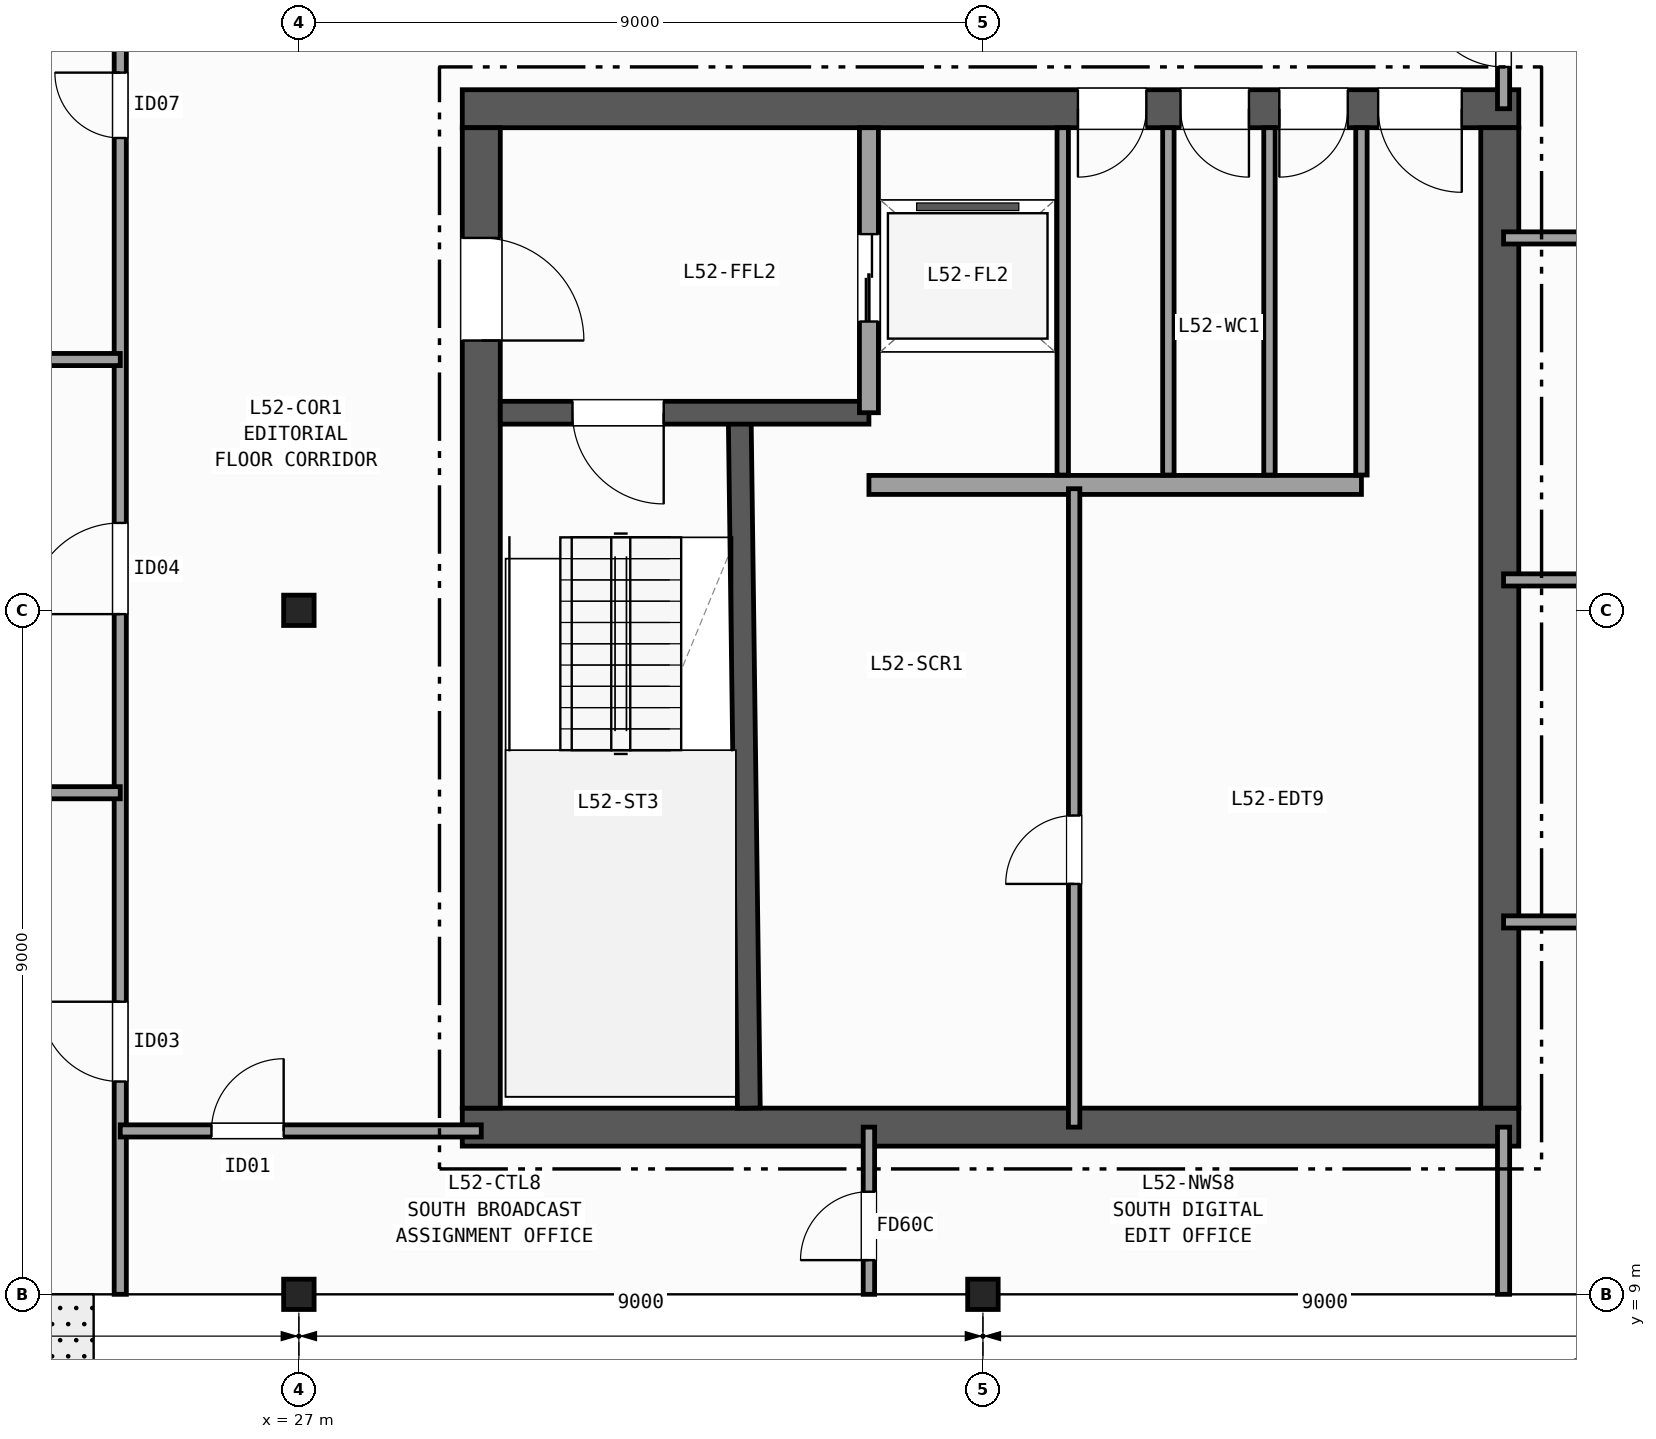
"""IFC4 building model, lengths in metres.
Left out: names, types, materials, properties, quantities, classifications, styles, units other than length and angle.
Written with IfcOpenShell. Run it as: python <this file> out.ifc"""

import sys

from ifc_helpers import new_model, si_unit, direction, frame, frame_2d, origin, origin_2d, place, context, subcontext, project, spatial, rectangle, i_section, extrude, element, fill, save


model = new_model("IFC4")
c1 = context("Model", 3, precision=1e-05, world=origin(), true_north=direction((0.0, 1.0)))
c2 = subcontext(c1, "Body", "Model", "MODEL_VIEW")
j1 = project(units=[si_unit("LENGTHUNIT", "METRE"), si_unit("PLANEANGLEUNIT", "RADIAN")], contexts=[c1])
p1 = place(None, origin())
s1 = spatial("IfcSite", under=j1, at=p1, CompositionType="ELEMENT")
p2 = place(p1, origin())
s2 = spatial("IfcBuilding", under=s1, at=p2, CompositionType="ELEMENT")
p3 = place(p2, frame((0.0, 0.0, 209.9)))
s3 = spatial("IfcBuildingStorey", under=s2, at=p3, CompositionType="ELEMENT", Elevation=209.9)
for number, where, z_axis, x_axis in (
    (1, (27.0, 9.0, 0.0), (0.0, 0.0, 1.0), (1.0, 0.0, 0.0)),
    (2, (27.0, 18.0, 0.0), (0.0, 0.0, 1.0), (1.0, 0.0, 0.0)),
    (3, (36.0, 9.0, 0.0), (0.0, 0.0, 1.0), (1.0, 0.0, 0.0)),
):
    element("IfcColumn", number, at=place(p3, frame(where, z_axis=z_axis, x_axis=x_axis)), inside=s3, PredefinedType="COLUMN", context=c2, shape_type="SweptSolid", body=[
        extrude(i_section(OverallWidth=0.401, OverallDepth=0.399, WebThickness=0.025, FlangeThickness=0.04, FilletRadius=0.015, at=origin_2d()), origin(), (0.0, 0.0, 1.0), 3.7),
    ])
p4 = place(p3, frame((29.15, 11.2, 0.0), z_axis=(0.0, 0.0, 1.0), x_axis=(1.0, 0.0, 0.0)))
e4 = element("IfcWall", 4, at=p4, inside=s3, PredefinedType="SHEAR", context=c2, shape_type="SweptSolid", body=[
    extrude(rectangle(XDim=13.9, YDim=0.5, at=frame_2d((6.95, 0.0))), origin(), (0.0, 0.0, 1.0), 3.42),
])
p5 = place(p3, frame((43.05, 24.6, 0.0), z_axis=(0.0, 0.0, 1.0), x_axis=(-1.0, 0.0, 0.0)))
e5 = element("IfcWall", 5, at=p5, inside=s3, PredefinedType="SHEAR", context=c2, shape_type="SweptSolid", body=[
    extrude(rectangle(XDim=13.9, YDim=0.5, at=frame_2d((6.95, 0.0))), origin(), (0.0, 0.0, 1.0), 3.42),
])
p6 = place(p5, frame((0.75, 0.0, 0.0)))
e6 = element("IfcOpeningElement", 6, at=p6, cuts=e5, PredefinedType="OPENING", context=c2, shape_type="SweptSolid", body=[
    extrude(rectangle(XDim=1.1, YDim=2.15, at=frame_2d((0.55, 1.075))), frame((0.0, 0.26, 0.0), z_axis=(0.0, -1.0, 0.0), x_axis=(1.0, 0.0, 0.0)), (0.0, 0.0, 1.0), 0.52),
])
p7 = place(p5, frame((2.25, 0.0, 0.0)))
e7 = element("IfcOpeningElement", 7, at=p7, cuts=e5, PredefinedType="OPENING", context=c2, shape_type="SweptSolid", body=[
    extrude(rectangle(XDim=0.9, YDim=2.1, at=frame_2d((0.45, 1.05))), frame((0.0, 0.26, 0.0), z_axis=(0.0, -1.0, 0.0), x_axis=(1.0, 0.0, 0.0)), (0.0, 0.0, 1.0), 0.52),
])
p8 = place(p5, frame((3.55, 0.0, 0.0)))
e8 = element("IfcOpeningElement", 8, at=p8, cuts=e5, PredefinedType="OPENING", context=c2, shape_type="SweptSolid", body=[
    extrude(rectangle(XDim=0.9, YDim=2.1, at=frame_2d((0.45, 1.05))), frame((0.0, 0.26, 0.0), z_axis=(0.0, -1.0, 0.0), x_axis=(1.0, 0.0, 0.0)), (0.0, 0.0, 1.0), 0.52),
])
p9 = place(p5, frame((4.9, 0.0, 0.0)))
e9 = element("IfcOpeningElement", 9, at=p9, cuts=e5, PredefinedType="OPENING", context=c2, shape_type="SweptSolid", body=[
    extrude(rectangle(XDim=0.9, YDim=2.1, at=frame_2d((0.45, 1.05))), frame((0.0, 0.26, 0.0), z_axis=(0.0, -1.0, 0.0), x_axis=(1.0, 0.0, 0.0)), (0.0, 0.0, 1.0), 0.52),
])
p10 = place(p3, frame((29.4, 24.35, 0.0), z_axis=(0.0, 0.0, 1.0), x_axis=(0.0, -1.0, 0.0)))
e10 = element("IfcWall", 10, at=p10, inside=s3, PredefinedType="SHEAR", context=c2, shape_type="SweptSolid", body=[
    extrude(rectangle(XDim=12.9, YDim=0.5, at=frame_2d((6.45, 0.0))), origin(), (0.0, 0.0, 1.0), 3.42),
])
p11 = place(p10, frame((1.45, 0.0, 0.0)))
e11 = element("IfcOpeningElement", 11, at=p11, cuts=e10, PredefinedType="OPENING", context=c2, shape_type="SweptSolid", body=[
    extrude(rectangle(XDim=1.35, YDim=2.15, at=frame_2d((0.675, 1.075))), frame((0.0, 0.26, 0.0), z_axis=(0.0, -1.0, 0.0), x_axis=(1.0, 0.0, 0.0)), (0.0, 0.0, 1.0), 0.52),
])
p12 = place(p3, frame((42.8, 11.45, 0.0), z_axis=(0.0, 0.0, 1.0), x_axis=(0.0, 1.0, 0.0)))
e12 = element("IfcWall", 12, at=p12, inside=s3, PredefinedType="SHEAR", context=c2, shape_type="SweptSolid", body=[
    extrude(rectangle(XDim=12.9, YDim=0.5, at=frame_2d((6.45, 0.0))), origin(), (0.0, 0.0, 1.0), 3.42),
])
p13 = place(p3, frame((32.92, 11.45, 0.0), z_axis=(0.0, 0.0, 1.0), x_axis=(-0.013171578211, 0.999913251001, 0.0)))
e13 = element("IfcWall", 13, at=p13, inside=s3, PredefinedType="SHEAR", context=c2, shape_type="SweptSolid", body=[
    extrude(rectangle(XDim=9.101, YDim=0.3, at=frame_2d((4.55, 0.0))), origin(), (0.0, 0.0, 1.0), 3.42),
])
p14 = place(p3, frame((34.5, 20.6, 0.0), z_axis=(0.0, 0.0, 1.0), x_axis=(-1.0, 0.0, 0.0)))
e14 = element("IfcWall", 14, at=p14, inside=s3, PredefinedType="SHEAR", context=c2, shape_type="SweptSolid", body=[
    extrude(rectangle(XDim=4.85, YDim=0.3, at=frame_2d((2.425, 0.0))), origin(), (0.0, 0.0, 1.0), 3.42),
])
p15 = place(p14, frame((2.7, 0.0, 0.0)))
e15 = element("IfcOpeningElement", 15, at=p15, cuts=e14, PredefinedType="OPENING", context=c2, shape_type="SweptSolid", body=[
    extrude(rectangle(XDim=1.2, YDim=2.15, at=frame_2d((0.6, 1.075))), frame((0.0, 0.16, 0.0), z_axis=(0.0, -1.0, 0.0), x_axis=(1.0, 0.0, 0.0)), (0.0, 0.0, 1.0), 0.32),
])
p16 = place(p3, frame((34.5, 20.6, 0.0), z_axis=(0.0, 0.0, 1.0), x_axis=(0.0, 1.0, 0.0)))
e16 = element("IfcWall", 16, at=p16, inside=s3, PredefinedType="PARTITIONING", context=c2, shape_type="SweptSolid", body=[
    extrude(rectangle(XDim=3.75, YDim=0.25, at=frame_2d((1.875, 0.0))), origin(), (0.0, 0.0, 1.0), 3.42),
])
p17 = place(p16, frame((1.2, 0.0, 0.0)))
e17 = element("IfcOpeningElement", 17, at=p17, cuts=e16, PredefinedType="OPENING", context=c2, shape_type="SweptSolid", body=[
    extrude(rectangle(XDim=1.15, YDim=2.15, at=frame_2d((0.575, 1.075))), frame((0.0, 0.135, 0.0), z_axis=(0.0, -1.0, 0.0), x_axis=(1.0, 0.0, 0.0)), (0.0, 0.0, 1.0), 0.27),
])
p18 = place(p3, frame((34.5, 19.65, 0.0), z_axis=(0.0, 0.0, 1.0), x_axis=(1.0, 0.0, 0.0)))
e18 = element("IfcWall", 18, at=p18, inside=s3, PredefinedType="PARTITIONING", context=c2, shape_type="SweptSolid", body=[
    extrude(rectangle(XDim=6.48, YDim=0.25, at=frame_2d((3.24, 0.0))), origin(), (0.0, 0.0, 1.0), 3.42),
])
p19 = place(p3, frame((37.2, 11.2, 0.0), z_axis=(0.0, 0.0, 1.0), x_axis=(0.0, 1.0, 0.0)))
e19 = element("IfcWall", 19, at=p19, inside=s3, PredefinedType="PARTITIONING", context=c2, shape_type="SweptSolid", body=[
    extrude(rectangle(XDim=8.4, YDim=0.15, at=frame_2d((4.2, 0.0))), origin(), (0.0, 0.0, 1.0), 3.42),
])
p20 = place(p19, frame((3.2, 0.0, 0.0)))
e20 = element("IfcOpeningElement", 20, at=p20, cuts=e19, PredefinedType="OPENING", context=c2, shape_type="SweptSolid", body=[
    extrude(rectangle(XDim=0.9, YDim=2.1, at=frame_2d((0.45, 1.05))), frame((0.0, 0.085, 0.0), z_axis=(0.0, -1.0, 0.0), x_axis=(1.0, 0.0, 0.0)), (0.0, 0.0, 1.0), 0.17),
])
for number, where, z_axis, x_axis in (
    (21, (37.05, 19.78, 0.0), (0.0, 0.0, 1.0), (0.0, 1.0, 0.0)),
    (22, (38.44, 19.78, 0.0), (0.0, 0.0, 1.0), (0.0, 1.0, 0.0)),
    (23, (39.77, 19.78, 0.0), (0.0, 0.0, 1.0), (0.0, 1.0, 0.0)),
    (24, (40.98, 19.78, 0.0), (0.0, 0.0, 1.0), (0.0, 1.0, 0.0)),
):
    element("IfcWall", number, at=place(p3, frame(where, z_axis=z_axis, x_axis=x_axis)), inside=s3, PredefinedType="PARTITIONING", context=c2, shape_type="SweptSolid", body=[
        extrude(rectangle(XDim=4.57, YDim=0.15, at=frame_2d((2.285, 0.0))), origin(), (0.0, 0.0, 1.0), 3.42),
    ])
p21 = place(p3, frame((24.65, 9.0, 0.0), z_axis=(0.0, 0.0, 1.0), x_axis=(0.0, 1.0, 0.0)))
e25 = element("IfcWall", 25, at=p21, inside=s3, PredefinedType="PARTITIONING", context=c2, shape_type="SweptSolid", body=[
    extrude(rectangle(XDim=19.2, YDim=0.16, at=frame_2d((9.6, 0.0))), origin(), (0.0, 0.0, 1.0), 2.707),
])
p22 = place(p21, frame((2.8, 0.0, 0.0)))
e26 = element("IfcOpeningElement", 26, at=p22, cuts=e25, PredefinedType="OPENING", context=c2, shape_type="SweptSolid", body=[
    extrude(rectangle(XDim=1.05, YDim=2.15, at=frame_2d((0.525, 1.075))), frame((0.0, 0.09, 0.0), z_axis=(0.0, -1.0, 0.0), x_axis=(1.0, 0.0, 0.0)), (0.0, 0.0, 1.0), 0.18),
])
p23 = place(p21, frame((8.95, 0.0, 0.0)))
e27 = element("IfcOpeningElement", 27, at=p23, cuts=e25, PredefinedType="OPENING", context=c2, shape_type="SweptSolid", body=[
    extrude(rectangle(XDim=1.2, YDim=2.15, at=frame_2d((0.6, 1.075))), frame((0.0, 0.09, 0.0), z_axis=(0.0, -1.0, 0.0), x_axis=(1.0, 0.0, 0.0)), (0.0, 0.0, 1.0), 0.18),
])
p24 = place(p21, frame((15.215, 0.0, 0.0)))
e28 = element("IfcOpeningElement", 28, at=p24, cuts=e25, PredefinedType="OPENING", context=c2, shape_type="SweptSolid", body=[
    extrude(rectangle(XDim=0.86, YDim=2.05, at=frame_2d((0.43, 1.025))), frame((0.0, 0.09, 0.0), z_axis=(0.0, -1.0, 0.0), x_axis=(1.0, 0.0, 0.0)), (0.0, 0.0, 1.0), 0.18),
])
for number, where, z_axis, x_axis in (
    (29, (18.0, 15.6, 0.0), (0.0, 0.0, 1.0), (1.0, 0.0, 0.0)),
    (30, (18.0, 21.3, 0.0), (0.0, 0.0, 1.0), (1.0, 0.0, 0.0)),
):
    element("IfcWall", number, at=place(p3, frame(where, z_axis=z_axis, x_axis=x_axis)), inside=s3, PredefinedType="PARTITIONING", context=c2, shape_type="SweptSolid", body=[
        extrude(rectangle(XDim=6.65, YDim=0.16, at=frame_2d((3.325, 0.0))), origin(), (0.0, 0.0, 1.0), 2.792),
    ])
p25 = place(p3, frame((24.65, 11.15, 0.0), z_axis=(0.0, 0.0, 1.0), x_axis=(1.0, 0.0, 0.0)))
e31 = element("IfcWall", 31, at=p25, inside=s3, PredefinedType="PARTITIONING", context=c2, shape_type="SweptSolid", body=[
    extrude(rectangle(XDim=4.75, YDim=0.16, at=frame_2d((2.375, 0.0))), origin(), (0.0, 0.0, 1.0), 2.792),
])
p26 = place(p25, frame((1.2, 0.0, 0.0)))
e32 = element("IfcOpeningElement", 32, at=p26, cuts=e31, PredefinedType="OPENING", context=c2, shape_type="SweptSolid", body=[
    extrude(rectangle(XDim=0.95, YDim=2.1, at=frame_2d((0.475, 1.05))), frame((0.0, 0.09, 0.0), z_axis=(0.0, -1.0, 0.0), x_axis=(1.0, 0.0, 0.0)), (0.0, 0.0, 1.0), 0.18),
])
p27 = place(p3, frame((34.5, 9.0, 0.0), z_axis=(0.0, 0.0, 1.0), x_axis=(0.0, 1.0, 0.0)))
e33 = element("IfcWall", 33, at=p27, inside=s3, PredefinedType="PARTITIONING", context=c2, shape_type="SweptSolid", body=[
    extrude(rectangle(XDim=2.2, YDim=0.15, at=frame_2d((1.1, 0.0))), origin(), (0.0, 0.0, 1.0), 2.707),
])
p28 = place(p27, frame((0.45, 0.0, 0.0)))
e34 = element("IfcOpeningElement", 34, at=p28, cuts=e33, PredefinedType="OPENING", context=c2, shape_type="SweptSolid", body=[
    extrude(rectangle(XDim=0.9, YDim=2.1, at=frame_2d((0.45, 1.05))), frame((0.0, 0.085, 0.0), z_axis=(0.0, -1.0, 0.0), x_axis=(1.0, 0.0, 0.0)), (0.0, 0.0, 1.0), 0.17),
])
p29 = place(p3, frame((42.85, 9.0, 0.0), z_axis=(0.0, 0.0, 1.0), x_axis=(0.0, 1.0, 0.0)))
e35 = element("IfcWall", 35, at=p29, inside=s3, PredefinedType="PARTITIONING", context=c2, shape_type="SweptSolid", body=[
    extrude(rectangle(XDim=2.2, YDim=0.16, at=frame_2d((1.1, 0.0))), origin(), (0.0, 0.0, 1.0), 2.707),
])
p30 = place(p3, frame((42.85, 24.6, 0.0), z_axis=(0.0, 0.0, 1.0), x_axis=(0.0, 1.0, 0.0)))
e36 = element("IfcWall", 36, at=p30, inside=s3, PredefinedType="PARTITIONING", context=c2, shape_type="SweptSolid", body=[
    extrude(rectangle(XDim=2.4, YDim=0.16, at=frame_2d((1.2, 0.0))), origin(), (0.0, 0.0, 1.0), 2.707),
])
p31 = place(p30, frame((0.55, 0.0, 0.0)))
e37 = element("IfcOpeningElement", 37, at=p31, cuts=e36, PredefinedType="OPENING", context=c2, shape_type="SweptSolid", body=[
    extrude(rectangle(XDim=1.05, YDim=2.15, at=frame_2d((0.525, 1.075))), frame((0.0, 0.09, 0.0), z_axis=(0.0, -1.0, 0.0), x_axis=(1.0, 0.0, 0.0)), (0.0, 0.0, 1.0), 0.18),
])
p32 = place(p3, frame((42.85, 13.9, 0.0), z_axis=(0.0, 0.0, 1.0), x_axis=(1.0, 0.0, 0.0)))
e38 = element("IfcWall", 38, at=p32, inside=s3, PredefinedType="PARTITIONING", context=c2, shape_type="SweptSolid", body=[
    extrude(rectangle(XDim=11.865, YDim=0.16, at=frame_2d((5.933, 0.0))), origin(), (0.0, 0.0, 1.0), 3.42),
])
p33 = place(p32, frame((4.6, 0.0, 0.0)))
e39 = element("IfcOpeningElement", 39, at=p33, cuts=e38, PredefinedType="OPENING", context=c2, shape_type="SweptSolid", body=[
    extrude(rectangle(XDim=1.2, YDim=2.15, at=frame_2d((0.6, 1.075))), frame((0.0, 0.09, 0.0), z_axis=(0.0, -1.0, 0.0), x_axis=(1.0, 0.0, 0.0)), (0.0, 0.0, 1.0), 0.18),
])
p34 = place(p3, frame((42.85, 18.4, 0.0), z_axis=(0.0, 0.0, 1.0), x_axis=(1.0, 0.0, 0.0)))
e40 = element("IfcWall", 40, at=p34, inside=s3, PredefinedType="PARTITIONING", context=c2, shape_type="SweptSolid", body=[
    extrude(rectangle(XDim=11.15, YDim=0.16, at=frame_2d((5.575, 0.0))), origin(), (0.0, 0.0, 1.0), 3.42),
])
p35 = place(p34, frame((4.6, 0.0, 0.0)))
e41 = element("IfcOpeningElement", 41, at=p35, cuts=e40, PredefinedType="OPENING", context=c2, shape_type="SweptSolid", body=[
    extrude(rectangle(XDim=0.86, YDim=2.05, at=frame_2d((0.43, 1.025))), frame((0.0, 0.09, 0.0), z_axis=(0.0, -1.0, 0.0), x_axis=(1.0, 0.0, 0.0)), (0.0, 0.0, 1.0), 0.18),
])
p36 = place(p3, frame((42.85, 22.9, 0.0), z_axis=(0.0, 0.0, 1.0), x_axis=(1.0, 0.0, 0.0)))
e42 = element("IfcWall", 42, at=p36, inside=s3, PredefinedType="PARTITIONING", context=c2, shape_type="SweptSolid", body=[
    extrude(rectangle(XDim=11.653, YDim=0.16, at=frame_2d((5.826, 0.0))), origin(), (0.0, 0.0, 1.0), 3.42),
])
p37 = place(p36, frame((4.6, 0.0, 0.0)))
e43 = element("IfcOpeningElement", 43, at=p37, cuts=e42, PredefinedType="OPENING", context=c2, shape_type="SweptSolid", body=[
    extrude(rectangle(XDim=0.95, YDim=2.1, at=frame_2d((0.475, 1.05))), frame((0.0, 0.09, 0.0), z_axis=(0.0, -1.0, 0.0), x_axis=(1.0, 0.0, 0.0)), (0.0, 0.0, 1.0), 0.18),
])
p38 = place(p15, origin())
e44 = element("IfcDoor", 44, at=p38, inside=s3, OperationType="SINGLE_SWING_LEFT", PredefinedType="DOOR", context=c2, shape_type="SweptSolid", body=[
    extrude(rectangle(XDim=1.2, YDim=2.15, at=frame_2d((0.6, 1.075))), frame((0.0, 0.025, 0.0), z_axis=(0.0, -1.0, 0.0), x_axis=(1.0, 0.0, 0.0)), (0.0, 0.0, 1.0), 0.05),
])
fill(e15, e44)
p39 = place(p11, origin())
e45 = element("IfcDoor", 45, at=p39, inside=s3, OperationType="SINGLE_SWING_RIGHT", PredefinedType="DOOR", context=c2, shape_type="SweptSolid", body=[
    extrude(rectangle(XDim=1.35, YDim=2.15, at=frame_2d((0.675, 1.075))), frame((0.0, 0.025, 0.0), z_axis=(0.0, -1.0, 0.0), x_axis=(1.0, 0.0, 0.0)), (0.0, 0.0, 1.0), 0.05),
])
fill(e11, e45)
p40 = place(p6, origin())
e46 = element("IfcDoor", 46, at=p40, inside=s3, OperationType="SINGLE_SWING_LEFT", PredefinedType="DOOR", context=c2, shape_type="SweptSolid", body=[
    extrude(rectangle(XDim=1.1, YDim=2.15, at=frame_2d((0.55, 1.075))), frame((0.0, 0.025, 0.0), z_axis=(0.0, -1.0, 0.0), x_axis=(1.0, 0.0, 0.0)), (0.0, 0.0, 1.0), 0.05),
])
fill(e6, e46)
p41 = place(p7, origin())
e47 = element("IfcDoor", 47, at=p41, inside=s3, OperationType="SINGLE_SWING_RIGHT", PredefinedType="DOOR", context=c2, shape_type="SweptSolid", body=[
    extrude(rectangle(XDim=0.9, YDim=2.1, at=frame_2d((0.45, 1.05))), frame((0.0, 0.025, 0.0), z_axis=(0.0, -1.0, 0.0), x_axis=(1.0, 0.0, 0.0)), (0.0, 0.0, 1.0), 0.05),
])
fill(e7, e47)
p42 = place(p8, origin())
e48 = element("IfcDoor", 48, at=p42, inside=s3, OperationType="SINGLE_SWING_LEFT", PredefinedType="DOOR", context=c2, shape_type="SweptSolid", body=[
    extrude(rectangle(XDim=0.9, YDim=2.1, at=frame_2d((0.45, 1.05))), frame((0.0, 0.025, 0.0), z_axis=(0.0, -1.0, 0.0), x_axis=(1.0, 0.0, 0.0)), (0.0, 0.0, 1.0), 0.05),
])
fill(e8, e48)
p43 = place(p9, origin())
e49 = element("IfcDoor", 49, at=p43, inside=s3, OperationType="SINGLE_SWING_RIGHT", PredefinedType="DOOR", context=c2, shape_type="SweptSolid", body=[
    extrude(rectangle(XDim=0.9, YDim=2.1, at=frame_2d((0.45, 1.05))), frame((0.0, 0.025, 0.0), z_axis=(0.0, -1.0, 0.0), x_axis=(1.0, 0.0, 0.0)), (0.0, 0.0, 1.0), 0.05),
])
fill(e9, e49)
p44 = place(p17, origin())
e50 = element("IfcDoor", 50, at=p44, inside=s3, OperationType="DOUBLE_DOOR_SLIDING", PredefinedType="DOOR", context=c2, shape_type="SweptSolid", body=[
    extrude(rectangle(XDim=1.15, YDim=2.15, at=frame_2d((0.575, 1.075))), frame((0.0, 0.025, 0.0), z_axis=(0.0, -1.0, 0.0), x_axis=(1.0, 0.0, 0.0)), (0.0, 0.0, 1.0), 0.05),
])
fill(e17, e50)
p45 = place(p20, origin())
e51 = element("IfcDoor", 51, at=p45, inside=s3, OperationType="SINGLE_SWING_LEFT", PredefinedType="DOOR", context=c2, shape_type="SweptSolid", body=[
    extrude(rectangle(XDim=0.9, YDim=2.1, at=frame_2d((0.45, 1.05))), frame((0.0, 0.025, 0.0), z_axis=(0.0, -1.0, 0.0), x_axis=(1.0, 0.0, 0.0)), (0.0, 0.0, 1.0), 0.05),
])
fill(e20, e51)
p46 = place(p22, origin())
e52 = element("IfcDoor", 52, at=p46, inside=s3, OperationType="SINGLE_SWING_RIGHT", PredefinedType="DOOR", context=c2, shape_type="SweptSolid", body=[
    extrude(rectangle(XDim=1.05, YDim=2.15, at=frame_2d((0.525, 1.075))), frame((0.0, 0.025, 0.0), z_axis=(0.0, -1.0, 0.0), x_axis=(1.0, 0.0, 0.0)), (0.0, 0.0, 1.0), 0.05),
])
fill(e26, e52)
p47 = place(p23, origin())
e53 = element("IfcDoor", 53, at=p47, inside=s3, OperationType="SINGLE_SWING_LEFT", PredefinedType="DOOR", context=c2, shape_type="SweptSolid", body=[
    extrude(rectangle(XDim=1.2, YDim=2.15, at=frame_2d((0.6, 1.075))), frame((0.0, 0.025, 0.0), z_axis=(0.0, -1.0, 0.0), x_axis=(1.0, 0.0, 0.0)), (0.0, 0.0, 1.0), 0.05),
])
fill(e27, e53)
p48 = place(p24, origin())
e54 = element("IfcDoor", 54, at=p48, inside=s3, OperationType="SINGLE_SWING_RIGHT", PredefinedType="DOOR", context=c2, shape_type="SweptSolid", body=[
    extrude(rectangle(XDim=0.86, YDim=2.05, at=frame_2d((0.43, 1.025))), frame((0.0, 0.025, 0.0), z_axis=(0.0, -1.0, 0.0), x_axis=(1.0, 0.0, 0.0)), (0.0, 0.0, 1.0), 0.05),
])
fill(e28, e54)
p49 = place(p26, origin())
e55 = element("IfcDoor", 55, at=p49, inside=s3, OperationType="SINGLE_SWING_RIGHT", PredefinedType="DOOR", context=c2, shape_type="SweptSolid", body=[
    extrude(rectangle(XDim=0.95, YDim=2.1, at=frame_2d((0.475, 1.05))), frame((0.0, 0.025, 0.0), z_axis=(0.0, -1.0, 0.0), x_axis=(1.0, 0.0, 0.0)), (0.0, 0.0, 1.0), 0.05),
])
fill(e32, e55)
p50 = place(p28, origin())
e56 = element("IfcDoor", 56, at=p50, inside=s3, OperationType="SINGLE_SWING_LEFT", PredefinedType="DOOR", context=c2, shape_type="SweptSolid", body=[
    extrude(rectangle(XDim=0.9, YDim=2.1, at=frame_2d((0.45, 1.05))), frame((0.0, 0.025, 0.0), z_axis=(0.0, -1.0, 0.0), x_axis=(1.0, 0.0, 0.0)), (0.0, 0.0, 1.0), 0.05),
])
fill(e34, e56)
p51 = place(p31, origin())
e57 = element("IfcDoor", 57, at=p51, inside=s3, OperationType="SINGLE_SWING_RIGHT", PredefinedType="DOOR", context=c2, shape_type="SweptSolid", body=[
    extrude(rectangle(XDim=1.05, YDim=2.15, at=frame_2d((0.525, 1.075))), frame((0.0, 0.025, 0.0), z_axis=(0.0, -1.0, 0.0), x_axis=(1.0, 0.0, 0.0)), (0.0, 0.0, 1.0), 0.05),
])
fill(e37, e57)
save(model, sys.argv[1])
